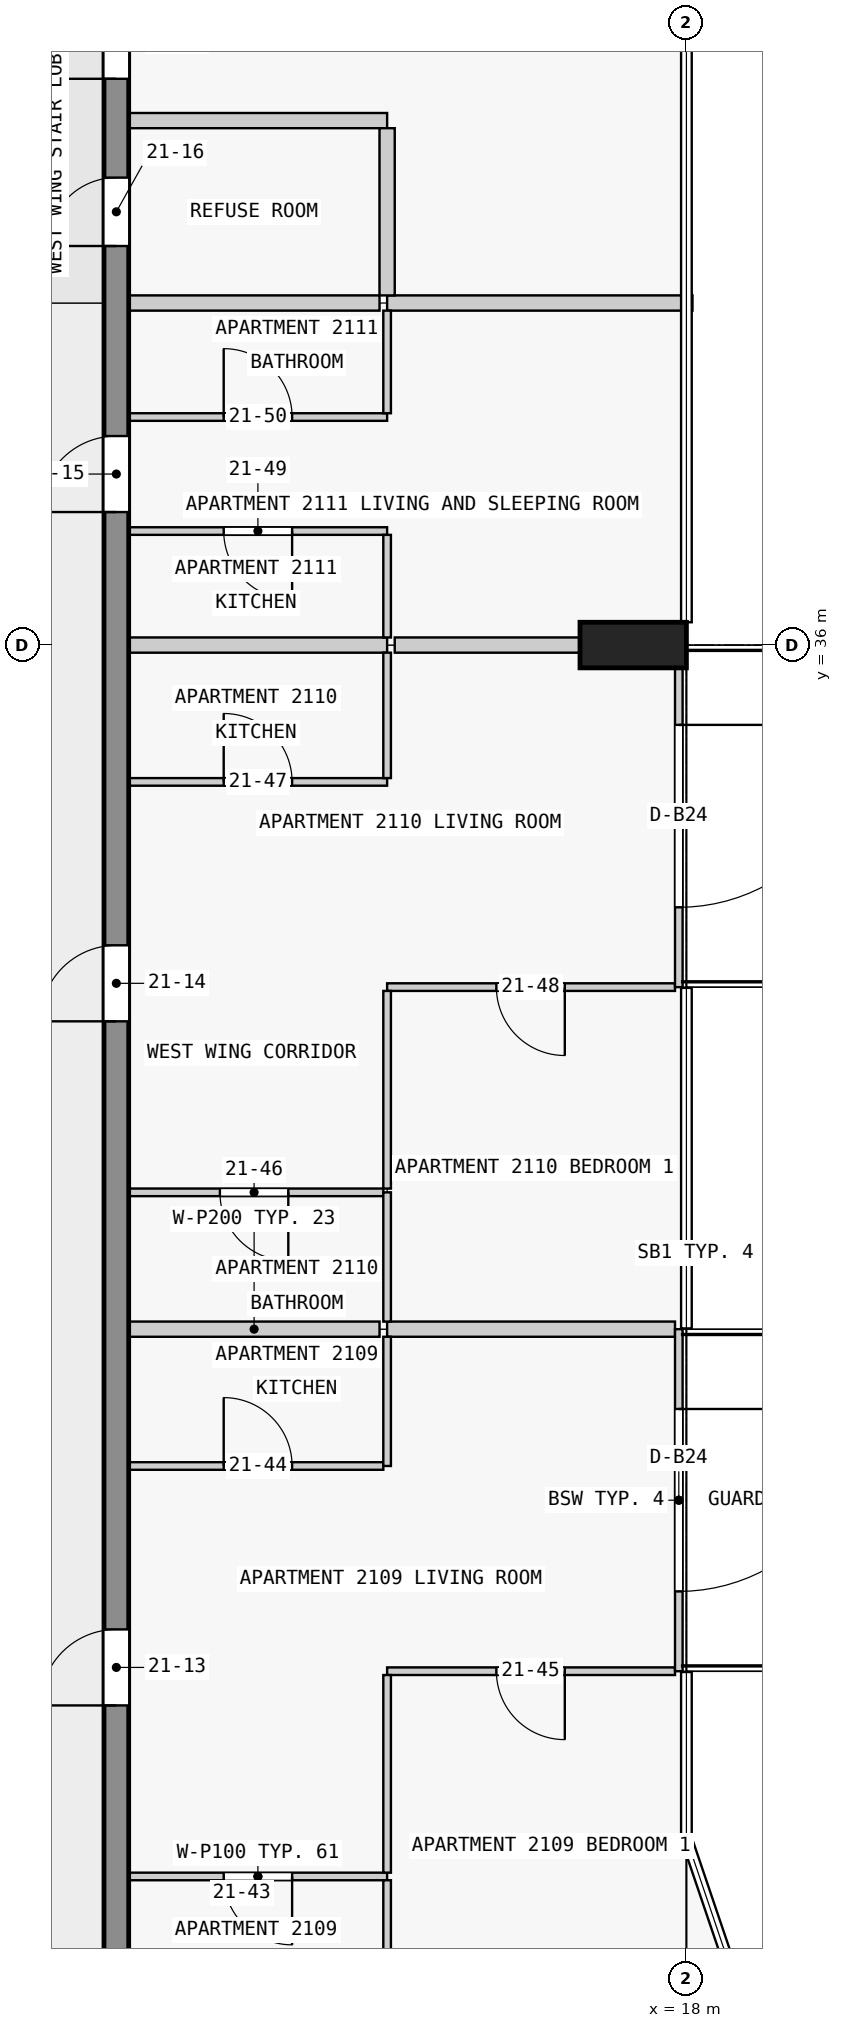
"""IFC4 building model, lengths in metres.
Left out: names, types, materials, properties, quantities, classifications, styles, units other than length and angle.
Written with IfcOpenShell. Run it as: python <this file> out.ifc"""

import sys

from ifc_helpers import new_model, si_unit, direction, frame, frame_2d, origin, origin_2d, place, context, subcontext, project, spatial, rectangle, extrude, element, fill, save


model = new_model("IFC4")
c1 = context("Model", 3, precision=1e-05, world=origin(), true_north=direction((0.0, 1.0)))
c2 = subcontext(c1, "Body", "Model", "MODEL_VIEW")
j1 = project(units=[si_unit("LENGTHUNIT", "METRE"), si_unit("PLANEANGLEUNIT", "RADIAN")], contexts=[c1])
p1 = place(None, origin())
s1 = spatial("IfcSite", under=j1, at=p1, CompositionType="ELEMENT")
p2 = place(p1, origin())
s2 = spatial("IfcBuilding", under=s1, at=p2, CompositionType="ELEMENT")
p3 = place(p2, frame((0.0, 0.0, 85.3)))
s3 = spatial("IfcBuildingStorey", under=s2, at=p3, CompositionType="ELEMENT", Elevation=85.3)
p4 = place(p3, frame((17.3, 36.0, 0.0), z_axis=(0.0, 0.0, 1.0), x_axis=(0.0, 1.0, 0.0)))
e1 = element("IfcColumn", 1, at=p4, inside=s3, PredefinedType="COLUMN", context=c2, shape_type="SweptSolid", body=[
    extrude(rectangle(XDim=0.6, YDim=1.4, at=origin_2d()), origin(), (0.0, 0.0, 1.0), 3.5),
])
p5 = place(p3, frame((10.5, 18.0, 0.0), z_axis=(0.0, 0.0, 1.0), x_axis=(0.0, 1.0, 0.0)))
e2 = element("IfcWall", 2, at=p5, inside=s3, PredefinedType="SHEAR", context=c2, shape_type="SweptSolid", body=[
    extrude(rectangle(XDim=27.0, YDim=0.325, at=frame_2d((13.5, 0.0))), origin(), (0.0, 0.0, 1.0), 3.25),
])
p6 = place(p5, frame((4.05, 0.0, 0.0)))
e3 = element("IfcOpeningElement", 3, at=p6, cuts=e2, PredefinedType="OPENING", context=c2, shape_type="SweptSolid", body=[
    extrude(rectangle(XDim=1.0, YDim=2.1, at=frame_2d((0.5, 1.05))), frame((0.0, 0.172, 0.0), z_axis=(0.0, -1.0, 0.0), x_axis=(1.0, 0.0, 0.0)), (0.0, 0.0, 1.0), 0.345),
])
p7 = place(p5, frame((13.05, 0.0, 0.0)))
e4 = element("IfcOpeningElement", 4, at=p7, cuts=e2, PredefinedType="OPENING", context=c2, shape_type="SweptSolid", body=[
    extrude(rectangle(XDim=1.0, YDim=2.1, at=frame_2d((0.5, 1.05))), frame((0.0, 0.172, 0.0), z_axis=(0.0, -1.0, 0.0), x_axis=(1.0, 0.0, 0.0)), (0.0, 0.0, 1.0), 0.345),
])
p8 = place(p5, frame((19.75, 0.0, 0.0)))
e5 = element("IfcOpeningElement", 5, at=p8, cuts=e2, PredefinedType="OPENING", context=c2, shape_type="SweptSolid", body=[
    extrude(rectangle(XDim=1.0, YDim=2.1, at=frame_2d((0.5, 1.05))), frame((0.0, 0.172, 0.0), z_axis=(0.0, -1.0, 0.0), x_axis=(1.0, 0.0, 0.0)), (0.0, 0.0, 1.0), 0.345),
])
p9 = place(p5, frame((23.25, 0.0, 0.0)))
e6 = element("IfcOpeningElement", 6, at=p9, cuts=e2, PredefinedType="OPENING", context=c2, shape_type="SweptSolid", body=[
    extrude(rectangle(XDim=0.9, YDim=2.1, at=frame_2d((0.45, 1.05))), frame((0.0, 0.172, 0.0), z_axis=(0.0, -1.0, 0.0), x_axis=(1.0, 0.0, 0.0)), (0.0, 0.0, 1.0), 0.345),
])
p10 = place(p5, frame((25.45, 0.0, 0.0)))
e7 = element("IfcOpeningElement", 7, at=p10, cuts=e2, PredefinedType="OPENING", context=c2, shape_type="SweptSolid", body=[
    extrude(rectangle(XDim=1.0, YDim=2.1, at=frame_2d((0.5, 1.05))), frame((0.0, 0.172, 0.0), z_axis=(0.0, -1.0, 0.0), x_axis=(1.0, 0.0, 0.0)), (0.0, 0.0, 1.0), 0.345),
])
p11 = place(p3, frame((17.9, 27.0, 0.0), z_axis=(0.0, 0.0, 1.0), x_axis=(0.0, -1.0, 0.0)))
e8 = element("IfcWall", 8, at=p11, inside=s3, PredefinedType="STANDARD", context=c2, shape_type="SweptSolid", body=[
    extrude(rectangle(XDim=4.5, YDim=0.1, at=frame_2d((2.25, 0.0))), origin(), (0.0, 0.0, 1.0), 3.25),
])
p12 = place(p11, frame((1.05, 0.0, 0.0)))
e9 = element("IfcOpeningElement", 9, at=p12, cuts=e8, PredefinedType="OPENING", context=c2, shape_type="SweptSolid", body=[
    extrude(rectangle(XDim=2.4, YDim=2.4, at=frame_2d((1.2, 1.2))), frame((0.0, 0.06, 0.0), z_axis=(0.0, -1.0, 0.0), x_axis=(1.0, 0.0, 0.0)), (0.0, 0.0, 1.0), 0.12),
])
p13 = place(p3, frame((17.9, 36.0, 0.0), z_axis=(0.0, 0.0, 1.0), x_axis=(0.0, -1.0, 0.0)))
e10 = element("IfcWall", 10, at=p13, inside=s3, PredefinedType="STANDARD", context=c2, shape_type="SweptSolid", body=[
    extrude(rectangle(XDim=4.5, YDim=0.1, at=frame_2d((2.25, 0.0))), origin(), (0.0, 0.0, 1.0), 3.25),
])
p14 = place(p13, frame((1.05, 0.0, 0.0)))
e11 = element("IfcOpeningElement", 11, at=p14, cuts=e10, PredefinedType="OPENING", context=c2, shape_type="SweptSolid", body=[
    extrude(rectangle(XDim=2.4, YDim=2.4, at=frame_2d((1.2, 1.2))), frame((0.0, 0.06, 0.0), z_axis=(0.0, -1.0, 0.0), x_axis=(1.0, 0.0, 0.0)), (0.0, 0.0, 1.0), 0.12),
])
p15 = place(p3, frame((14.062, 19.8, 0.0), z_axis=(0.0, 0.0, 1.0), x_axis=(-1.0, 0.0, 0.0)))
e12 = element("IfcWall", 12, at=p15, inside=s3, PredefinedType="PARTITIONING", context=c2, shape_type="SweptSolid", body=[
    extrude(rectangle(XDim=3.4, YDim=0.1, at=frame_2d((1.7, 0.0))), origin(), (0.0, 0.0, 1.0), 3.25),
])
p16 = place(p15, frame((1.25, 0.0, 0.0)))
e13 = element("IfcOpeningElement", 13, at=p16, cuts=e12, PredefinedType="OPENING", context=c2, shape_type="SweptSolid", body=[
    extrude(rectangle(XDim=0.9, YDim=2.1, at=frame_2d((0.45, 1.05))), frame((0.0, 0.06, 0.0), z_axis=(0.0, -1.0, 0.0), x_axis=(1.0, 0.0, 0.0)), (0.0, 0.0, 1.0), 0.12),
])
p17 = place(p3, frame((17.85, 22.5, 0.0), z_axis=(0.0, 0.0, 1.0), x_axis=(-1.0, 0.0, 0.0)))
e14 = element("IfcWall", 14, at=p17, inside=s3, PredefinedType="PARTITIONING", context=c2, shape_type="SweptSolid", body=[
    extrude(rectangle(XDim=3.788, YDim=0.1, at=frame_2d((1.894, 0.0))), origin(), (0.0, 0.0, 1.0), 3.25),
])
p18 = place(p17, frame((1.45, 0.0, 0.0)))
e15 = element("IfcOpeningElement", 15, at=p18, cuts=e14, PredefinedType="OPENING", context=c2, shape_type="SweptSolid", body=[
    extrude(rectangle(XDim=0.9, YDim=2.1, at=frame_2d((0.45, 1.05))), frame((0.0, 0.06, 0.0), z_axis=(0.0, -1.0, 0.0), x_axis=(1.0, 0.0, 0.0)), (0.0, 0.0, 1.0), 0.12),
])
p19 = place(p3, frame((10.663, 25.2, 0.0), z_axis=(0.0, 0.0, 1.0), x_axis=(1.0, 0.0, 0.0)))
e16 = element("IfcWall", 16, at=p19, inside=s3, PredefinedType="PARTITIONING", context=c2, shape_type="SweptSolid", body=[
    extrude(rectangle(XDim=3.35, YDim=0.1, at=frame_2d((1.675, 0.0))), origin(), (0.0, 0.0, 1.0), 3.25),
])
p20 = place(p19, frame((1.25, 0.0, 0.0)))
e17 = element("IfcOpeningElement", 17, at=p20, cuts=e16, PredefinedType="OPENING", context=c2, shape_type="SweptSolid", body=[
    extrude(rectangle(XDim=0.9, YDim=2.1, at=frame_2d((0.45, 1.05))), frame((0.0, 0.06, 0.0), z_axis=(0.0, -1.0, 0.0), x_axis=(1.0, 0.0, 0.0)), (0.0, 0.0, 1.0), 0.12),
])
p21 = place(p3, frame((13.962, 27.0, 0.0), z_axis=(0.0, 0.0, 1.0), x_axis=(-1.0, 0.0, 0.0)))
e18 = element("IfcWall", 18, at=p21, inside=s3, PredefinedType="PARTITIONING", context=c2, shape_type="SweptSolid", body=[
    extrude(rectangle(XDim=3.3, YDim=0.2, at=frame_2d((1.65, 0.0))), origin(), (0.0, 0.0, 1.0), 3.25),
])
p22 = place(p3, frame((14.062, 27.0, 0.0), z_axis=(0.0, 0.0, 1.0), x_axis=(1.0, 0.0, 0.0)))
e19 = element("IfcWall", 19, at=p22, inside=s3, PredefinedType="PARTITIONING", context=c2, shape_type="SweptSolid", body=[
    extrude(rectangle(XDim=3.788, YDim=0.2, at=frame_2d((1.894, 0.0))), origin(), (0.0, 0.0, 1.0), 3.25),
])
p23 = place(p3, frame((14.012, 28.8, 0.0), z_axis=(0.0, 0.0, 1.0), x_axis=(-1.0, 0.0, 0.0)))
e20 = element("IfcWall", 20, at=p23, inside=s3, PredefinedType="PARTITIONING", context=c2, shape_type="SweptSolid", body=[
    extrude(rectangle(XDim=3.35, YDim=0.1, at=frame_2d((1.675, 0.0))), origin(), (0.0, 0.0, 1.0), 3.25),
])
p24 = place(p23, frame((1.25, 0.0, 0.0)))
e21 = element("IfcOpeningElement", 21, at=p24, cuts=e20, PredefinedType="OPENING", context=c2, shape_type="SweptSolid", body=[
    extrude(rectangle(XDim=0.9, YDim=2.1, at=frame_2d((0.45, 1.05))), frame((0.0, 0.06, 0.0), z_axis=(0.0, -1.0, 0.0), x_axis=(1.0, 0.0, 0.0)), (0.0, 0.0, 1.0), 0.12),
])
p25 = place(p3, frame((17.85, 31.5, 0.0), z_axis=(0.0, 0.0, 1.0), x_axis=(-1.0, 0.0, 0.0)))
e22 = element("IfcWall", 22, at=p25, inside=s3, PredefinedType="PARTITIONING", context=c2, shape_type="SweptSolid", body=[
    extrude(rectangle(XDim=3.788, YDim=0.1, at=frame_2d((1.894, 0.0))), origin(), (0.0, 0.0, 1.0), 3.25),
])
p26 = place(p25, frame((1.45, 0.0, 0.0)))
e23 = element("IfcOpeningElement", 23, at=p26, cuts=e22, PredefinedType="OPENING", context=c2, shape_type="SweptSolid", body=[
    extrude(rectangle(XDim=0.9, YDim=2.1, at=frame_2d((0.45, 1.05))), frame((0.0, 0.06, 0.0), z_axis=(0.0, -1.0, 0.0), x_axis=(1.0, 0.0, 0.0)), (0.0, 0.0, 1.0), 0.12),
])
p27 = place(p3, frame((10.663, 34.2, 0.0), z_axis=(0.0, 0.0, 1.0), x_axis=(1.0, 0.0, 0.0)))
e24 = element("IfcWall", 24, at=p27, inside=s3, PredefinedType="PARTITIONING", context=c2, shape_type="SweptSolid", body=[
    extrude(rectangle(XDim=3.4, YDim=0.1, at=frame_2d((1.7, 0.0))), origin(), (0.0, 0.0, 1.0), 3.25),
])
p28 = place(p27, frame((1.25, 0.0, 0.0)))
e25 = element("IfcOpeningElement", 25, at=p28, cuts=e24, PredefinedType="OPENING", context=c2, shape_type="SweptSolid", body=[
    extrude(rectangle(XDim=0.9, YDim=2.1, at=frame_2d((0.45, 1.05))), frame((0.0, 0.06, 0.0), z_axis=(0.0, -1.0, 0.0), x_axis=(1.0, 0.0, 0.0)), (0.0, 0.0, 1.0), 0.12),
])
p29 = place(p3, frame((14.062, 36.0, 0.0), z_axis=(0.0, 0.0, 1.0), x_axis=(-1.0, 0.0, 0.0)))
e26 = element("IfcWall", 26, at=p29, inside=s3, PredefinedType="PARTITIONING", context=c2, shape_type="SweptSolid", body=[
    extrude(rectangle(XDim=3.4, YDim=0.2, at=frame_2d((1.7, 0.0))), origin(), (0.0, 0.0, 1.0), 3.25),
])
p30 = place(p3, frame((14.163, 36.0, 0.0), z_axis=(0.0, 0.0, 1.0), x_axis=(1.0, 0.0, 0.0)))
e27 = element("IfcWall", 27, at=p30, inside=s3, PredefinedType="PARTITIONING", context=c2, shape_type="SweptSolid", body=[
    extrude(rectangle(XDim=2.438, YDim=0.2, at=frame_2d((1.219, 0.0))), origin(), (0.0, 0.0, 1.0), 3.25),
])
p31 = place(p3, frame((14.062, 37.5, 0.0), z_axis=(0.0, 0.0, 1.0), x_axis=(-1.0, 0.0, 0.0)))
e28 = element("IfcWall", 28, at=p31, inside=s3, PredefinedType="PARTITIONING", context=c2, shape_type="SweptSolid", body=[
    extrude(rectangle(XDim=3.4, YDim=0.1, at=frame_2d((1.7, 0.0))), origin(), (0.0, 0.0, 1.0), 3.25),
])
p32 = place(p31, frame((1.25, 0.0, 0.0)))
e29 = element("IfcOpeningElement", 29, at=p32, cuts=e28, PredefinedType="OPENING", context=c2, shape_type="SweptSolid", body=[
    extrude(rectangle(XDim=0.9, YDim=2.1, at=frame_2d((0.45, 1.05))), frame((0.0, 0.06, 0.0), z_axis=(0.0, -1.0, 0.0), x_axis=(1.0, 0.0, 0.0)), (0.0, 0.0, 1.0), 0.12),
])
p33 = place(p3, frame((10.663, 39.0, 0.0), z_axis=(0.0, 0.0, 1.0), x_axis=(1.0, 0.0, 0.0)))
e30 = element("IfcWall", 30, at=p33, inside=s3, PredefinedType="PARTITIONING", context=c2, shape_type="SweptSolid", body=[
    extrude(rectangle(XDim=3.4, YDim=0.1, at=frame_2d((1.7, 0.0))), origin(), (0.0, 0.0, 1.0), 3.25),
])
p34 = place(p33, frame((1.25, 0.0, 0.0)))
e31 = element("IfcOpeningElement", 31, at=p34, cuts=e30, PredefinedType="OPENING", context=c2, shape_type="SweptSolid", body=[
    extrude(rectangle(XDim=0.9, YDim=2.1, at=frame_2d((0.45, 1.05))), frame((0.0, 0.06, 0.0), z_axis=(0.0, -1.0, 0.0), x_axis=(1.0, 0.0, 0.0)), (0.0, 0.0, 1.0), 0.12),
])
p35 = place(p3, frame((13.962, 40.5, 0.0), z_axis=(0.0, 0.0, 1.0), x_axis=(-1.0, 0.0, 0.0)))
e32 = element("IfcWall", 32, at=p35, inside=s3, PredefinedType="PARTITIONING", context=c2, shape_type="SweptSolid", body=[
    extrude(rectangle(XDim=3.3, YDim=0.2, at=frame_2d((1.65, 0.0))), origin(), (0.0, 0.0, 1.0), 3.25),
])
p36 = place(p3, frame((14.062, 40.5, 0.0), z_axis=(0.0, 0.0, 1.0), x_axis=(1.0, 0.0, 0.0)))
e33 = element("IfcWall", 33, at=p36, inside=s3, PredefinedType="PARTITIONING", context=c2, shape_type="SweptSolid", body=[
    extrude(rectangle(XDim=4.018, YDim=0.2, at=frame_2d((2.009, 0.0))), origin(), (0.0, 0.0, 1.0), 3.25),
])
p37 = place(p3, frame((14.062, 42.9, 0.0), z_axis=(0.0, 0.0, 1.0), x_axis=(-1.0, 0.0, 0.0)))
e34 = element("IfcWall", 34, at=p37, inside=s3, PredefinedType="PARTITIONING", context=c2, shape_type="SweptSolid", body=[
    extrude(rectangle(XDim=3.4, YDim=0.2, at=frame_2d((1.7, 0.0))), origin(), (0.0, 0.0, 1.0), 3.25),
])
for number, where, z_axis, x_axis in (
    (35, (14.062, 22.45, 0.0), (0.0, 0.0, 1.0), (0.0, -1.0, 0.0)),
    (36, (14.062, 31.45, 0.0), (0.0, 0.0, 1.0), (0.0, -1.0, 0.0)),
):
    element("IfcWall", number, at=place(p3, frame(where, z_axis=z_axis, x_axis=x_axis)), inside=s3, PredefinedType="PARTITIONING", context=c2, shape_type="SweptSolid", body=[
        extrude(rectangle(XDim=2.6, YDim=0.1, at=frame_2d((1.3, 0.0))), origin(), (0.0, 0.0, 1.0), 3.25),
    ])
p38 = place(p3, frame((14.062, 18.0, 0.0), z_axis=(0.0, 0.0, 1.0), x_axis=(0.0, 1.0, 0.0)))
e37 = element("IfcWall", 37, at=p38, inside=s3, PredefinedType="PARTITIONING", context=c2, shape_type="SweptSolid", body=[
    extrude(rectangle(XDim=1.75, YDim=0.1, at=frame_2d((0.875, 0.0))), origin(), (0.0, 0.0, 1.0), 3.25),
])
for number, where, z_axis, x_axis in (
    (38, (14.062, 25.2, 0.0), (0.0, 0.0, 1.0), (0.0, 1.0, 0.0)),
    (39, (14.062, 27.1, 0.0), (0.0, 0.0, 1.0), (0.0, 1.0, 0.0)),
):
    element("IfcWall", number, at=place(p3, frame(where, z_axis=z_axis, x_axis=x_axis)), inside=s3, PredefinedType="PARTITIONING", context=c2, shape_type="SweptSolid", body=[
        extrude(rectangle(XDim=1.7, YDim=0.1, at=frame_2d((0.85, 0.0))), origin(), (0.0, 0.0, 1.0), 3.25),
    ])
p39 = place(p3, frame((14.062, 34.25, 0.0), z_axis=(0.0, 0.0, 1.0), x_axis=(0.0, 1.0, 0.0)))
e40 = element("IfcWall", 40, at=p39, inside=s3, PredefinedType="PARTITIONING", context=c2, shape_type="SweptSolid", body=[
    extrude(rectangle(XDim=1.65, YDim=0.1, at=frame_2d((0.825, 0.0))), origin(), (0.0, 0.0, 1.0), 3.25),
])
for number, where, z_axis, x_axis in (
    (41, (14.062, 36.1, 0.0), (0.0, 0.0, 1.0), (0.0, 1.0, 0.0)),
    (42, (14.062, 39.05, 0.0), (0.0, 0.0, 1.0), (0.0, 1.0, 0.0)),
):
    element("IfcWall", number, at=place(p3, frame(where, z_axis=z_axis, x_axis=x_axis)), inside=s3, PredefinedType="PARTITIONING", context=c2, shape_type="SweptSolid", body=[
        extrude(rectangle(XDim=1.35, YDim=0.1, at=frame_2d((0.675, 0.0))), origin(), (0.0, 0.0, 1.0), 3.25),
    ])
p40 = place(p3, frame((14.062, 40.6, 0.0), z_axis=(0.0, 0.0, 1.0), x_axis=(0.0, 1.0, 0.0)))
e43 = element("IfcWall", 43, at=p40, inside=s3, PredefinedType="PARTITIONING", context=c2, shape_type="SweptSolid", body=[
    extrude(rectangle(XDim=2.2, YDim=0.2, at=frame_2d((1.1, 0.0))), origin(), (0.0, 0.0, 1.0), 3.25),
])
p41 = place(p12, origin())
e44 = element("IfcDoor", 44, at=p41, inside=s3, OperationType="SINGLE_SWING_LEFT", PredefinedType="DOOR", context=c2, shape_type="SweptSolid", body=[
    extrude(rectangle(XDim=2.4, YDim=2.4, at=frame_2d((1.2, 1.2))), frame((0.0, 0.025, 0.0), z_axis=(0.0, -1.0, 0.0), x_axis=(1.0, 0.0, 0.0)), (0.0, 0.0, 1.0), 0.05),
])
fill(e9, e44)
p42 = place(p14, origin())
e45 = element("IfcDoor", 45, at=p42, inside=s3, OperationType="SINGLE_SWING_LEFT", PredefinedType="DOOR", context=c2, shape_type="SweptSolid", body=[
    extrude(rectangle(XDim=2.4, YDim=2.4, at=frame_2d((1.2, 1.2))), frame((0.0, 0.025, 0.0), z_axis=(0.0, -1.0, 0.0), x_axis=(1.0, 0.0, 0.0)), (0.0, 0.0, 1.0), 0.05),
])
fill(e11, e45)
p43 = place(p6, origin())
e46 = element("IfcDoor", 46, at=p43, inside=s3, OperationType="SINGLE_SWING_LEFT", PredefinedType="DOOR", context=c2, shape_type="SweptSolid", body=[
    extrude(rectangle(XDim=1.0, YDim=2.1, at=frame_2d((0.5, 1.05))), frame((0.0, 0.025, 0.0), z_axis=(0.0, -1.0, 0.0), x_axis=(1.0, 0.0, 0.0)), (0.0, 0.0, 1.0), 0.05),
])
fill(e3, e46)
p44 = place(p7, origin())
e47 = element("IfcDoor", 47, at=p44, inside=s3, OperationType="SINGLE_SWING_RIGHT", PredefinedType="DOOR", context=c2, shape_type="SweptSolid", body=[
    extrude(rectangle(XDim=1.0, YDim=2.1, at=frame_2d((0.5, 1.05))), frame((0.0, 0.025, 0.0), z_axis=(0.0, -1.0, 0.0), x_axis=(1.0, 0.0, 0.0)), (0.0, 0.0, 1.0), 0.05),
])
fill(e4, e47)
p45 = place(p8, origin())
e48 = element("IfcDoor", 48, at=p45, inside=s3, OperationType="SINGLE_SWING_RIGHT", PredefinedType="DOOR", context=c2, shape_type="SweptSolid", body=[
    extrude(rectangle(XDim=1.0, YDim=2.1, at=frame_2d((0.5, 1.05))), frame((0.0, 0.025, 0.0), z_axis=(0.0, -1.0, 0.0), x_axis=(1.0, 0.0, 0.0)), (0.0, 0.0, 1.0), 0.05),
])
fill(e5, e48)
p46 = place(p9, origin())
e49 = element("IfcDoor", 49, at=p46, inside=s3, OperationType="SINGLE_SWING_RIGHT", PredefinedType="DOOR", context=c2, shape_type="SweptSolid", body=[
    extrude(rectangle(XDim=0.9, YDim=2.1, at=frame_2d((0.45, 1.05))), frame((0.0, 0.025, 0.0), z_axis=(0.0, -1.0, 0.0), x_axis=(1.0, 0.0, 0.0)), (0.0, 0.0, 1.0), 0.05),
])
fill(e6, e49)
p47 = place(p10, origin())
e50 = element("IfcDoor", 50, at=p47, inside=s3, OperationType="SINGLE_SWING_RIGHT", PredefinedType="DOOR", context=c2, shape_type="SweptSolid", body=[
    extrude(rectangle(XDim=1.0, YDim=2.1, at=frame_2d((0.5, 1.05))), frame((0.0, 0.025, 0.0), z_axis=(0.0, -1.0, 0.0), x_axis=(1.0, 0.0, 0.0)), (0.0, 0.0, 1.0), 0.05),
])
fill(e7, e50)
p48 = place(p16, origin())
e51 = element("IfcDoor", 51, at=p48, inside=s3, OperationType="SINGLE_SWING_LEFT", PredefinedType="DOOR", context=c2, shape_type="SweptSolid", body=[
    extrude(rectangle(XDim=0.9, YDim=2.1, at=frame_2d((0.45, 1.05))), frame((0.0, 0.025, 0.0), z_axis=(0.0, -1.0, 0.0), x_axis=(1.0, 0.0, 0.0)), (0.0, 0.0, 1.0), 0.05),
])
fill(e13, e51)
p49 = place(p20, origin())
e52 = element("IfcDoor", 52, at=p49, inside=s3, OperationType="SINGLE_SWING_RIGHT", PredefinedType="DOOR", context=c2, shape_type="SweptSolid", body=[
    extrude(rectangle(XDim=0.9, YDim=2.1, at=frame_2d((0.45, 1.05))), frame((0.0, 0.025, 0.0), z_axis=(0.0, -1.0, 0.0), x_axis=(1.0, 0.0, 0.0)), (0.0, 0.0, 1.0), 0.05),
])
fill(e17, e52)
p50 = place(p18, origin())
e53 = element("IfcDoor", 53, at=p50, inside=s3, OperationType="SINGLE_SWING_RIGHT", PredefinedType="DOOR", context=c2, shape_type="SweptSolid", body=[
    extrude(rectangle(XDim=0.9, YDim=2.1, at=frame_2d((0.45, 1.05))), frame((0.0, 0.025, 0.0), z_axis=(0.0, -1.0, 0.0), x_axis=(1.0, 0.0, 0.0)), (0.0, 0.0, 1.0), 0.05),
])
fill(e15, e53)
p51 = place(p24, origin())
e54 = element("IfcDoor", 54, at=p51, inside=s3, OperationType="SINGLE_SWING_RIGHT", PredefinedType="DOOR", context=c2, shape_type="SweptSolid", body=[
    extrude(rectangle(XDim=0.9, YDim=2.1, at=frame_2d((0.45, 1.05))), frame((0.0, 0.025, 0.0), z_axis=(0.0, -1.0, 0.0), x_axis=(1.0, 0.0, 0.0)), (0.0, 0.0, 1.0), 0.05),
])
fill(e21, e54)
p52 = place(p28, origin())
e55 = element("IfcDoor", 55, at=p52, inside=s3, OperationType="SINGLE_SWING_LEFT", PredefinedType="DOOR", context=c2, shape_type="SweptSolid", body=[
    extrude(rectangle(XDim=0.9, YDim=2.1, at=frame_2d((0.45, 1.05))), frame((0.0, 0.025, 0.0), z_axis=(0.0, -1.0, 0.0), x_axis=(1.0, 0.0, 0.0)), (0.0, 0.0, 1.0), 0.05),
])
fill(e25, e55)
p53 = place(p26, origin())
e56 = element("IfcDoor", 56, at=p53, inside=s3, OperationType="SINGLE_SWING_RIGHT", PredefinedType="DOOR", context=c2, shape_type="SweptSolid", body=[
    extrude(rectangle(XDim=0.9, YDim=2.1, at=frame_2d((0.45, 1.05))), frame((0.0, 0.025, 0.0), z_axis=(0.0, -1.0, 0.0), x_axis=(1.0, 0.0, 0.0)), (0.0, 0.0, 1.0), 0.05),
])
fill(e23, e56)
p54 = place(p32, origin())
e57 = element("IfcDoor", 57, at=p54, inside=s3, OperationType="SINGLE_SWING_LEFT", PredefinedType="DOOR", context=c2, shape_type="SweptSolid", body=[
    extrude(rectangle(XDim=0.9, YDim=2.1, at=frame_2d((0.45, 1.05))), frame((0.0, 0.025, 0.0), z_axis=(0.0, -1.0, 0.0), x_axis=(1.0, 0.0, 0.0)), (0.0, 0.0, 1.0), 0.05),
])
fill(e29, e57)
p55 = place(p34, origin())
e58 = element("IfcDoor", 58, at=p55, inside=s3, OperationType="SINGLE_SWING_LEFT", PredefinedType="DOOR", context=c2, shape_type="SweptSolid", body=[
    extrude(rectangle(XDim=0.9, YDim=2.1, at=frame_2d((0.45, 1.05))), frame((0.0, 0.025, 0.0), z_axis=(0.0, -1.0, 0.0), x_axis=(1.0, 0.0, 0.0)), (0.0, 0.0, 1.0), 0.05),
])
fill(e31, e58)
save(model, sys.argv[1])
